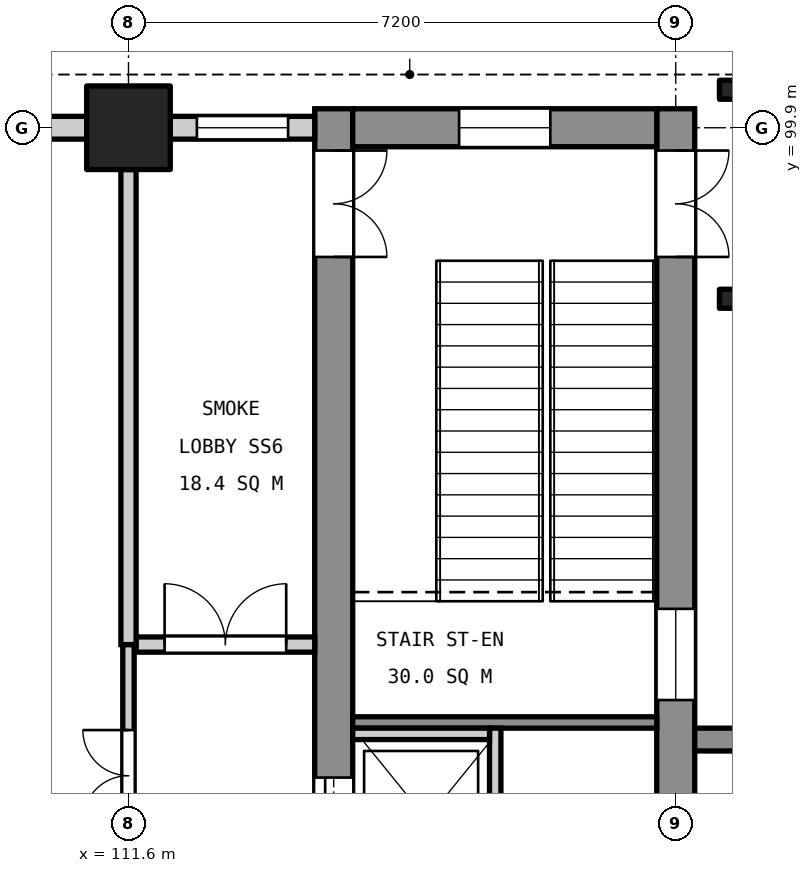
"""IFC4 building model, lengths in metres.
Left out: names, types, materials, properties, quantities, classifications, styles, units other than length and angle.
Written with IfcOpenShell. Run it as: python <this file> out.ifc"""

import sys

from ifc_helpers import new_model, si_unit, direction, frame, frame_2d, origin, origin_2d, place, context, subcontext, project, spatial, rectangle, i_section, extrude, element, fill, save


model = new_model("IFC4")
c1 = context("Model", 3, precision=1e-05, world=origin(), true_north=direction((0.0, 1.0)))
c2 = subcontext(c1, "Body", "Model", "MODEL_VIEW")
j1 = project(units=[si_unit("LENGTHUNIT", "METRE"), si_unit("PLANEANGLEUNIT", "RADIAN")], contexts=[c1])
p1 = place(None, origin())
s1 = spatial("IfcSite", under=j1, at=p1, CompositionType="ELEMENT")
p2 = place(p1, origin())
s2 = spatial("IfcBuilding", under=s1, at=p2, CompositionType="ELEMENT")
p3 = place(p2, origin())
s3 = spatial("IfcBuildingStorey", under=s2, at=p3, CompositionType="ELEMENT", Elevation=0.0)
p4 = place(p3, frame((111.6, 99.9, 0.0), z_axis=(0.0, 0.0, 1.0), x_axis=(1.0, 0.0, 0.0)))
e1 = element("IfcColumn", 1, at=p4, inside=s3, PredefinedType="COLUMN", context=c2, shape_type="SweptSolid", body=[
    extrude(rectangle(XDim=1.1, YDim=1.1, at=origin_2d()), origin(), (0.0, 0.0, 1.0), 6.0),
])
p5 = place(p3, frame((118.8, 88.85, 0.0), z_axis=(0.0, 0.0, 1.0), x_axis=(0.0, 1.0, 0.0)))
e2 = element("IfcWall", 2, at=p5, inside=s3, PredefinedType="SHEAR", context=c2, shape_type="SweptSolid", body=[
    extrude(rectangle(XDim=11.3, YDim=0.5, at=frame_2d((5.65, 0.0))), origin(), (0.0, 0.0, 1.0), 5.7),
])
p6 = place(p5, frame((9.35, 0.0, 0.0)))
e3 = element("IfcOpeningElement", 3, at=p6, cuts=e2, PredefinedType="OPENING", context=c2, shape_type="SweptSolid", body=[
    extrude(rectangle(XDim=1.4, YDim=2.1, at=frame_2d((0.7, 1.05))), frame((0.0, 0.26, 0.0), z_axis=(0.0, -1.0, 0.0), x_axis=(1.0, 0.0, 0.0)), (0.0, 0.0, 1.0), 0.52),
])
p7 = place(p5, frame((3.52, 0.0, 3.4)))
e4 = element("IfcOpeningElement", 4, at=p7, cuts=e2, PredefinedType="OPENING", context=c2, shape_type="SweptSolid", body=[
    extrude(rectangle(XDim=1.2, YDim=0.9, at=frame_2d((0.6, 0.45))), frame((0.0, 0.26, 0.0), z_axis=(0.0, -1.0, 0.0), x_axis=(1.0, 0.0, 0.0)), (0.0, 0.0, 1.0), 0.52),
])
p8 = place(p3, frame((114.3, 88.85, 0.0), z_axis=(0.0, 0.0, 1.0), x_axis=(0.0, 1.0, 0.0)))
e5 = element("IfcWall", 5, at=p8, inside=s3, PredefinedType="SHEAR", context=c2, shape_type="SweptSolid", body=[
    extrude(rectangle(XDim=11.3, YDim=0.5, at=frame_2d((5.65, 0.0))), origin(), (0.0, 0.0, 1.0), 5.7),
])
p9 = place(p8, frame((9.35, 0.0, 0.0)))
e6 = element("IfcOpeningElement", 6, at=p9, cuts=e5, PredefinedType="OPENING", context=c2, shape_type="SweptSolid", body=[
    extrude(rectangle(XDim=1.4, YDim=2.1, at=frame_2d((0.7, 1.05))), frame((0.0, 0.26, 0.0), z_axis=(0.0, -1.0, 0.0), x_axis=(1.0, 0.0, 0.0)), (0.0, 0.0, 1.0), 0.52),
])
p10 = place(p8, frame((1.4, 0.0, 0.0)))
e7 = element("IfcOpeningElement", 7, at=p10, cuts=e5, PredefinedType="OPENING", context=c2, shape_type="SweptSolid", body=[
    extrude(rectangle(XDim=1.1, YDim=2.1, at=frame_2d((0.55, 1.05))), frame((0.0, 0.26, 0.0), z_axis=(0.0, -1.0, 0.0), x_axis=(1.0, 0.0, 0.0)), (0.0, 0.0, 1.0), 0.52),
])
p11 = place(p3, frame((118.55, 99.9, 0.0), z_axis=(0.0, 0.0, 1.0), x_axis=(-1.0, 0.0, 0.0)))
e8 = element("IfcWall", 8, at=p11, inside=s3, PredefinedType="SHEAR", context=c2, shape_type="SweptSolid", body=[
    extrude(rectangle(XDim=4.0, YDim=0.5, at=frame_2d((2.0, 0.0))), origin(), (0.0, 0.0, 1.0), 5.7),
])
p12 = place(p11, frame((1.4, 0.0, 3.4)))
e9 = element("IfcOpeningElement", 9, at=p12, cuts=e8, PredefinedType="OPENING", context=c2, shape_type="SweptSolid", body=[
    extrude(rectangle(XDim=1.2, YDim=0.9, at=frame_2d((0.6, 0.45))), frame((0.0, 0.26, 0.0), z_axis=(0.0, -1.0, 0.0), x_axis=(1.0, 0.0, 0.0)), (0.0, 0.0, 1.0), 0.52),
])
p13 = place(p3, frame((119.05, 91.85, 0.0), z_axis=(0.0, 0.0, 1.0), x_axis=(1.0, 0.0, 0.0)))
e10 = element("IfcWall", 10, at=p13, inside=s3, PredefinedType="SHEAR", context=c2, shape_type="SweptSolid", body=[
    extrude(rectangle(XDim=1.25, YDim=0.3, at=frame_2d((0.625, 0.0))), origin(), (0.0, 0.0, 1.0), 6.0),
])
for number, where, z_axis, x_axis in (
    (11, (119.5, 97.65, 0.0), (0.0, 0.0, 1.0), (1.0, 0.0, 0.0)),
    (12, (119.5, 100.4, 0.0), (0.0, 0.0, 1.0), (1.0, 0.0, 0.0)),
):
    element("IfcColumn", number, at=place(p3, frame(where, z_axis=z_axis, x_axis=x_axis)), inside=s3, PredefinedType="COLUMN", context=c2, shape_type="SweptSolid", body=[
        extrude(i_section(OverallWidth=0.25, OverallDepth=0.25, WebThickness=0.009, FlangeThickness=0.014, FilletRadius=0.016, at=origin_2d()), origin(), (0.0, 0.0, 1.0), 4.8),
    ])
p14 = place(p3, frame((118.55, 92.075, 0.0), z_axis=(0.0, 0.0, 1.0), x_axis=(-1.0, 0.0, 0.0)))
e13 = element("IfcWall", 13, at=p14, inside=s3, PredefinedType="SOLIDWALL", context=c2, shape_type="SweptSolid", body=[
    extrude(rectangle(XDim=4.0, YDim=0.15, at=frame_2d((2.0, 0.0))), origin(), (0.0, 0.0, 1.0), 5.7),
])
p15 = place(p3, frame((116.425, 92.0, 0.0), z_axis=(0.0, 0.0, 1.0), x_axis=(0.0, -1.0, 0.0)))
e14 = element("IfcWall", 14, at=p15, inside=s3, PredefinedType="SOLIDWALL", context=c2, shape_type="SweptSolid", body=[
    extrude(rectangle(XDim=2.65, YDim=0.15, at=frame_2d((1.325, 0.0))), origin(), (0.0, 0.0, 1.0), 6.0),
])
p16 = place(p3, frame((116.35, 91.925, 0.0), z_axis=(0.0, 0.0, 1.0), x_axis=(-1.0, 0.0, 0.0)))
e15 = element("IfcWall", 15, at=p16, inside=s3, PredefinedType="SOLIDWALL", context=c2, shape_type="SweptSolid", body=[
    extrude(rectangle(XDim=1.8, YDim=0.15, at=frame_2d((0.9, 0.0))), origin(), (0.0, 0.0, 1.0), 6.0),
])
p17 = place(p3, frame((114.05, 99.9, 0.0), z_axis=(0.0, 0.0, 1.0), x_axis=(-1.0, 0.0, 0.0)))
e16 = element("IfcWall", 16, at=p17, inside=s3, PredefinedType="STANDARD", context=c2, shape_type="SweptSolid", body=[
    extrude(rectangle(XDim=1.9, YDim=0.3, at=frame_2d((0.95, 0.0))), origin(), (0.0, 0.0, 1.0), 4.9),
])
p18 = place(p17, frame((0.35, 0.0, 0.9)))
e17 = element("IfcOpeningElement", 17, at=p18, cuts=e16, PredefinedType="OPENING", context=c2, shape_type="SweptSolid", body=[
    extrude(rectangle(XDim=1.2, YDim=2.4, at=frame_2d((0.6, 1.2))), frame((0.0, 0.16, 0.0), z_axis=(0.0, -1.0, 0.0), x_axis=(1.0, 0.0, 0.0)), (0.0, 0.0, 1.0), 0.32),
])
p19 = place(p3, frame((111.05, 99.9, 0.0), z_axis=(0.0, 0.0, 1.0), x_axis=(-1.0, 0.0, 0.0)))
e18 = element("IfcWall", 18, at=p19, inside=s3, PredefinedType="STANDARD", context=c2, shape_type="SweptSolid", body=[
    extrude(rectangle(XDim=9.7, YDim=0.3, at=frame_2d((4.85, 0.0))), origin(), (0.0, 0.0, 1.0), 4.9),
])
p20 = place(p19, frame((0.625, 0.0, 0.9)))
e19 = element("IfcOpeningElement", 19, at=p20, cuts=e18, PredefinedType="OPENING", context=c2, shape_type="SweptSolid", body=[
    extrude(rectangle(XDim=1.8, YDim=3.0, at=frame_2d((0.9, 1.5))), frame((0.0, 0.16, 0.0), z_axis=(0.0, -1.0, 0.0), x_axis=(1.0, 0.0, 0.0)), (0.0, 0.0, 1.0), 0.32),
])
p21 = place(p19, frame((3.95, 0.0, 0.9)))
e20 = element("IfcOpeningElement", 20, at=p21, cuts=e18, PredefinedType="OPENING", context=c2, shape_type="SweptSolid", body=[
    extrude(rectangle(XDim=1.8, YDim=3.0, at=frame_2d((0.9, 1.5))), frame((0.0, 0.16, 0.0), z_axis=(0.0, -1.0, 0.0), x_axis=(1.0, 0.0, 0.0)), (0.0, 0.0, 1.0), 0.32),
])
p22 = place(p19, frame((7.275, 0.0, 0.9)))
e21 = element("IfcOpeningElement", 21, at=p22, cuts=e18, PredefinedType="OPENING", context=c2, shape_type="SweptSolid", body=[
    extrude(rectangle(XDim=1.8, YDim=3.0, at=frame_2d((0.9, 1.5))), frame((0.0, 0.16, 0.0), z_axis=(0.0, -1.0, 0.0), x_axis=(1.0, 0.0, 0.0)), (0.0, 0.0, 1.0), 0.32),
])
p23 = place(p3, frame((114.05, 93.1, 0.0), z_axis=(0.0, 0.0, 1.0), x_axis=(-1.0, 0.0, 0.0)))
e22 = element("IfcWall", 22, at=p23, inside=s3, PredefinedType="PARTITIONING", context=c2, shape_type="SweptSolid", body=[
    extrude(rectangle(XDim=2.35, YDim=0.2, at=frame_2d((1.175, 0.0))), origin(), (0.0, 0.0, 1.0), 4.6),
])
p24 = place(p23, frame((0.375, 0.0, 0.0)))
e23 = element("IfcOpeningElement", 23, at=p24, cuts=e22, PredefinedType="OPENING", context=c2, shape_type="SweptSolid", body=[
    extrude(rectangle(XDim=1.6, YDim=2.1, at=frame_2d((0.8, 1.05))), frame((0.0, 0.11, 0.0), z_axis=(0.0, -1.0, 0.0), x_axis=(1.0, 0.0, 0.0)), (0.0, 0.0, 1.0), 0.22),
])
p25 = place(p3, frame((111.6, 89.65, 0.0), z_axis=(0.0, 0.0, 1.0), x_axis=(0.0, 1.0, 0.0)))
e24 = element("IfcWall", 24, at=p25, inside=s3, PredefinedType="PARTITIONING", context=c2, shape_type="SweptSolid", body=[
    extrude(rectangle(XDim=3.45, YDim=0.15, at=frame_2d((1.725, 0.0))), origin(), (0.0, 0.0, 1.0), 4.6),
])
p26 = place(p25, frame((1.125, 0.0, 0.0)))
e25 = element("IfcOpeningElement", 25, at=p26, cuts=e24, PredefinedType="OPENING", context=c2, shape_type="SweptSolid", body=[
    extrude(rectangle(XDim=1.2, YDim=2.1, at=frame_2d((0.6, 1.05))), frame((0.0, 0.085, 0.0), z_axis=(0.0, -1.0, 0.0), x_axis=(1.0, 0.0, 0.0)), (0.0, 0.0, 1.0), 0.17),
])
p27 = place(p3, frame((111.6, 93.1, 0.0), z_axis=(0.0, 0.0, 1.0), x_axis=(0.0, 1.0, 0.0)))
e26 = element("IfcWall", 26, at=p27, inside=s3, PredefinedType="PARTITIONING", context=c2, shape_type="SweptSolid", body=[
    extrude(rectangle(XDim=6.25, YDim=0.2, at=frame_2d((3.125, 0.0))), origin(), (0.0, 0.0, 1.0), 4.6),
])
p28 = place(p9, frame((1.4, 0.0, 0.0), z_axis=(0.0, 0.0, 1.0), x_axis=(-1.0, 0.0, 0.0)))
e27 = element("IfcDoor", 27, at=p28, inside=s3, OperationType="DOUBLE_DOOR_SINGLE_SWING", PredefinedType="DOOR", context=c2, shape_type="SweptSolid", body=[
    extrude(rectangle(XDim=1.4, YDim=2.1, at=frame_2d((0.7, 1.05))), frame((0.0, 0.025, 0.0), z_axis=(0.0, -1.0, 0.0), x_axis=(1.0, 0.0, 0.0)), (0.0, 0.0, 1.0), 0.05),
])
fill(e6, e27)
p29 = place(p6, frame((1.4, 0.0, 0.0), z_axis=(0.0, 0.0, 1.0), x_axis=(-1.0, 0.0, 0.0)))
e28 = element("IfcDoor", 28, at=p29, inside=s3, OperationType="DOUBLE_DOOR_SINGLE_SWING", PredefinedType="DOOR", context=c2, shape_type="SweptSolid", body=[
    extrude(rectangle(XDim=1.4, YDim=2.1, at=frame_2d((0.7, 1.05))), frame((0.0, 0.025, 0.0), z_axis=(0.0, -1.0, 0.0), x_axis=(1.0, 0.0, 0.0)), (0.0, 0.0, 1.0), 0.05),
])
fill(e3, e28)
p30 = place(p10, origin())
e29 = element("IfcDoor", 29, at=p30, inside=s3, OperationType="SLIDING_TO_LEFT", PredefinedType="DOOR", context=c2, shape_type="SweptSolid", body=[
    extrude(rectangle(XDim=1.1, YDim=2.1, at=frame_2d((0.55, 1.05))), frame((0.0, 0.025, 0.0), z_axis=(0.0, -1.0, 0.0), x_axis=(1.0, 0.0, 0.0)), (0.0, 0.0, 1.0), 0.05),
])
fill(e7, e29)
p31 = place(p18, origin())
e30 = element("IfcWindow", 30, at=p31, inside=s3, PartitioningType="SINGLE_PANEL", PredefinedType="WINDOW", context=c2, shape_type="SweptSolid", body=[
    extrude(rectangle(XDim=1.2, YDim=2.4, at=frame_2d((0.6, 1.2))), frame((0.0, 0.03, 0.0), z_axis=(0.0, -1.0, 0.0), x_axis=(1.0, 0.0, 0.0)), (0.0, 0.0, 1.0), 0.06),
])
fill(e17, e30)
p32 = place(p7, origin())
e31 = element("IfcWindow", 31, at=p32, inside=s3, PartitioningType="SINGLE_PANEL", PredefinedType="WINDOW", context=c2, shape_type="SweptSolid", body=[
    extrude(rectangle(XDim=1.2, YDim=0.9, at=frame_2d((0.6, 0.45))), frame((0.0, 0.03, 0.0), z_axis=(0.0, -1.0, 0.0), x_axis=(1.0, 0.0, 0.0)), (0.0, 0.0, 1.0), 0.06),
])
fill(e4, e31)
p33 = place(p12, origin())
e32 = element("IfcWindow", 32, at=p33, inside=s3, PartitioningType="SINGLE_PANEL", PredefinedType="WINDOW", context=c2, shape_type="SweptSolid", body=[
    extrude(rectangle(XDim=1.2, YDim=0.9, at=frame_2d((0.6, 0.45))), frame((0.0, 0.03, 0.0), z_axis=(0.0, -1.0, 0.0), x_axis=(1.0, 0.0, 0.0)), (0.0, 0.0, 1.0), 0.06),
])
fill(e9, e32)
p34 = place(p26, origin())
e33 = element("IfcDoor", 33, at=p34, inside=s3, OperationType="DOUBLE_DOOR_SINGLE_SWING", PredefinedType="DOOR", context=c2, shape_type="SweptSolid", body=[
    extrude(rectangle(XDim=1.2, YDim=2.1, at=frame_2d((0.6, 1.05))), frame((0.0, 0.025, 0.0), z_axis=(0.0, -1.0, 0.0), x_axis=(1.0, 0.0, 0.0)), (0.0, 0.0, 1.0), 0.05),
])
fill(e25, e33)
p35 = place(p24, frame((1.6, 0.0, 0.0), z_axis=(0.0, 0.0, 1.0), x_axis=(-1.0, 0.0, 0.0)))
e34 = element("IfcDoor", 34, at=p35, inside=s3, OperationType="DOUBLE_DOOR_SINGLE_SWING", PredefinedType="DOOR", context=c2, shape_type="SweptSolid", body=[
    extrude(rectangle(XDim=1.6, YDim=2.1, at=frame_2d((0.8, 1.05))), frame((0.0, 0.025, 0.0), z_axis=(0.0, -1.0, 0.0), x_axis=(1.0, 0.0, 0.0)), (0.0, 0.0, 1.0), 0.05),
])
fill(e23, e34)
save(model, sys.argv[1])
